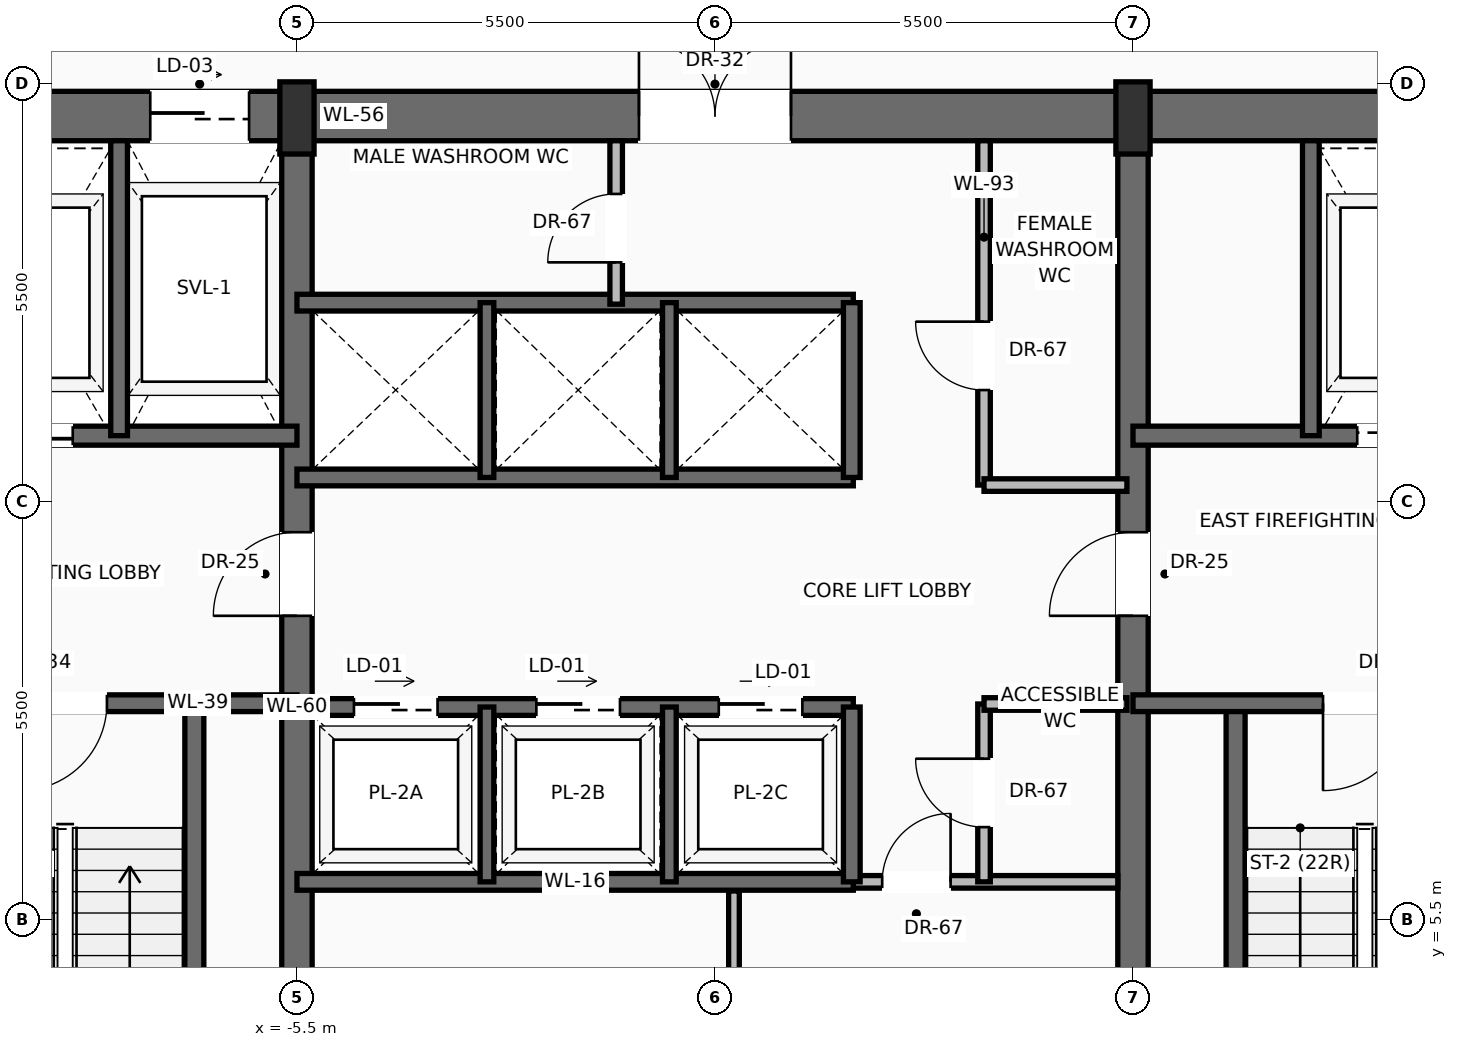
"""IFC4 building model, lengths in metres.
Left out: names, types, materials, properties, quantities, classifications, styles, units other than length and angle.
Written with IfcOpenShell. Run it as: python <this file> out.ifc"""

import sys

from ifc_helpers import new_model, si_unit, direction, frame, frame_2d, origin, origin_2d, place, context, subcontext, project, spatial, rectangle, extrude, source, transform, mapped, element, fill, save


model = new_model("IFC4")
c1 = context("Model", 3, precision=1e-05, world=origin(), true_north=direction((0.0, 1.0)))
c2 = subcontext(c1, "Body", "Model", "MODEL_VIEW")
j1 = project(units=[si_unit("LENGTHUNIT", "METRE"), si_unit("PLANEANGLEUNIT", "RADIAN")], contexts=[c1])
p1 = place(None, origin())
s1 = spatial("IfcSite", under=j1, at=p1, CompositionType="ELEMENT")
p2 = place(p1, origin())
s2 = spatial("IfcBuilding", under=s1, at=p2, CompositionType="ELEMENT")
p3 = place(p2, frame((0.0, 0.0, 200.6)))
s3 = spatial("IfcBuildingStorey", under=s2, at=p3, CompositionType="ELEMENT", Elevation=200.6)
p4 = place(p3, frame((-10.8, 16.075, 0.0), z_axis=(0.0, 0.0, 1.0), x_axis=(1.0, 0.0, 0.0)))
e1 = element("IfcWall", 1, at=p4, inside=s3, PredefinedType="SHEAR", context=c2, shape_type="SweptSolid", body=[
    extrude(rectangle(XDim=21.6, YDim=0.65, at=frame_2d((10.8, 0.0))), origin(), (0.0, 0.0, 1.0), 3.47),
])
p5 = place(p4, frame((3.37, 0.0, 0.0)))
e2 = element("IfcOpeningElement", 2, at=p5, cuts=e1, PredefinedType="OPENING", context=c2, shape_type="SweptSolid", body=[
    extrude(rectangle(XDim=1.3, YDim=2.3, at=frame_2d((0.65, 1.15))), frame((0.0, 0.335, 0.0), z_axis=(0.0, -1.0, 0.0), x_axis=(1.0, 0.0, 0.0)), (0.0, 0.0, 1.0), 0.67),
])
p6 = place(p4, frame((9.8, 0.0, 0.0)))
e3 = element("IfcOpeningElement", 3, at=p6, cuts=e1, PredefinedType="OPENING", context=c2, shape_type="SweptSolid", body=[
    extrude(rectangle(XDim=2.0, YDim=2.4, at=frame_2d((1.0, 1.2))), frame((0.0, 0.335, 0.0), z_axis=(0.0, -1.0, 0.0), x_axis=(1.0, 0.0, 0.0)), (0.0, 0.0, 1.0), 0.67),
])
p7 = place(p3, frame((-5.5, 0.525, 0.0), z_axis=(0.0, 0.0, 1.0), x_axis=(0.0, 1.0, 0.0)))
e4 = element("IfcWall", 4, at=p7, inside=s3, PredefinedType="SHEAR", context=c2, shape_type="SweptSolid", body=[
    extrude(rectangle(XDim=15.55, YDim=0.4, at=frame_2d((7.775, 0.0))), origin(), (0.0, 0.0, 1.0), 3.47),
])
p8 = place(p7, frame((8.975, 0.0, 0.0)))
e5 = element("IfcOpeningElement", 5, at=p8, cuts=e4, PredefinedType="OPENING", context=c2, shape_type="SweptSolid", body=[
    extrude(rectangle(XDim=1.1, YDim=2.2, at=frame_2d((0.55, 1.1))), frame((0.0, 0.21, 0.0), z_axis=(0.0, -1.0, 0.0), x_axis=(1.0, 0.0, 0.0)), (0.0, 0.0, 1.0), 0.42),
])
p9 = place(p3, frame((5.5, 0.525, 0.0), z_axis=(0.0, 0.0, 1.0), x_axis=(0.0, 1.0, 0.0)))
e6 = element("IfcWall", 6, at=p9, inside=s3, PredefinedType="SHEAR", context=c2, shape_type="SweptSolid", body=[
    extrude(rectangle(XDim=15.55, YDim=0.4, at=frame_2d((7.775, 0.0))), origin(), (0.0, 0.0, 1.0), 3.47),
])
p10 = place(p9, frame((8.975, 0.0, 0.0)))
e7 = element("IfcOpeningElement", 7, at=p10, cuts=e6, PredefinedType="OPENING", context=c2, shape_type="SweptSolid", body=[
    extrude(rectangle(XDim=1.1, YDim=2.2, at=frame_2d((0.55, 1.1))), frame((0.0, 0.21, 0.0), z_axis=(0.0, -1.0, 0.0), x_axis=(1.0, 0.0, 0.0)), (0.0, 0.0, 1.0), 0.42),
])
m1 = source(origin(), c2, "Body", "SweptSolid", [
    extrude(rectangle(XDim=0.45, YDim=0.95, at=origin_2d()), origin(), (0.0, 0.0, 1.0), 3.7),
])
for number, where, z_axis, x_axis in (
    (8, (-5.5, 16.05, 0.0), (0.0, 0.0, 1.0), (1.0, 0.0, 0.0)),
    (9, (5.5, 16.05, 0.0), (0.0, 0.0, 1.0), (1.0, 0.0, 0.0)),
):
    element("IfcColumn", number, at=place(p3, frame(where, z_axis=z_axis, x_axis=x_axis)), inside=s3, PredefinedType="PILASTER", context=c2, shape_type="MappedRepresentation", body=[
        mapped(m1, transform((0.0, 0.0, 0.0), scale=1.0)),
    ])
p11 = place(p3, frame((-6.85, 0.85, 0.0), z_axis=(0.0, 0.0, 1.0), x_axis=(0.0, 1.0, 0.0)))
e10 = element("IfcWall", 10, at=p11, inside=s3, PredefinedType="SOLIDWALL", context=c2, shape_type="SweptSolid", body=[
    extrude(rectangle(XDim=7.5, YDim=0.25, at=frame_2d((3.75, 0.0))), origin(), (0.0, 0.0, 1.0), 3.47),
])
p12 = place(p3, frame((-5.5, 8.35, 0.0), z_axis=(0.0, 0.0, 1.0), x_axis=(-1.0, 0.0, 0.0)))
e11 = element("IfcWall", 11, at=p12, inside=s3, PredefinedType="SOLIDWALL", context=c2, shape_type="SweptSolid", body=[
    extrude(rectangle(XDim=4.65, YDim=0.22, at=frame_2d((2.325, 0.0))), origin(), (0.0, 0.0, 1.0), 3.47),
])
p13 = place(p12, frame((2.5, 0.0, 0.0)))
e12 = element("IfcOpeningElement", 12, at=p13, cuts=e11, PredefinedType="OPENING", context=c2, shape_type="SweptSolid", body=[
    extrude(rectangle(XDim=1.15, YDim=2.2, at=frame_2d((0.575, 1.1))), frame((0.0, 0.12, 0.0), z_axis=(0.0, -1.0, 0.0), x_axis=(1.0, 0.0, 0.0)), (0.0, 0.0, 1.0), 0.24),
])
p14 = place(p3, frame((-5.5, 11.87, 0.0), z_axis=(0.0, 0.0, 1.0), x_axis=(-1.0, 0.0, 0.0)))
e13 = element("IfcWall", 13, at=p14, inside=s3, PredefinedType="SOLIDWALL", context=c2, shape_type="SweptSolid", body=[
    extrude(rectangle(XDim=4.65, YDim=0.25, at=frame_2d((2.325, 0.0))), origin(), (0.0, 0.0, 1.0), 3.47),
])
p15 = place(p14, frame((2.95, 0.0, 0.0)))
e14 = element("IfcOpeningElement", 14, at=p15, cuts=e13, PredefinedType="OPENING", context=c2, shape_type="SweptSolid", body=[
    extrude(rectangle(XDim=1.2, YDim=2.25, at=frame_2d((0.6, 1.125))), frame((0.0, 0.135, 0.0), z_axis=(0.0, -1.0, 0.0), x_axis=(1.0, 0.0, 0.0)), (0.0, 0.0, 1.0), 0.27),
])
p16 = place(p3, frame((-7.84, 11.87, 0.0), z_axis=(0.0, 0.0, 1.0), x_axis=(0.0, 1.0, 0.0)))
e15 = element("IfcWall", 15, at=p16, inside=s3, PredefinedType="SOLIDWALL", context=c2, shape_type="SweptSolid", body=[
    extrude(rectangle(XDim=3.88, YDim=0.22, at=frame_2d((1.94, 0.0))), origin(), (0.0, 0.0, 1.0), 3.47),
])
p17 = place(p3, frame((6.85, 0.85, 0.0), z_axis=(0.0, 0.0, 1.0), x_axis=(0.0, 1.0, 0.0)))
e16 = element("IfcWall", 16, at=p17, inside=s3, PredefinedType="SOLIDWALL", context=c2, shape_type="SweptSolid", body=[
    extrude(rectangle(XDim=7.5, YDim=0.25, at=frame_2d((3.75, 0.0))), origin(), (0.0, 0.0, 1.0), 3.47),
])
p18 = place(p3, frame((10.15, 8.35, 0.0), z_axis=(0.0, 0.0, 1.0), x_axis=(-1.0, 0.0, 0.0)))
e17 = element("IfcWall", 17, at=p18, inside=s3, PredefinedType="SOLIDWALL", context=c2, shape_type="SweptSolid", body=[
    extrude(rectangle(XDim=4.65, YDim=0.22, at=frame_2d((2.325, 0.0))), origin(), (0.0, 0.0, 1.0), 3.47),
])
p19 = place(p18, frame((1.0, 0.0, 0.0)))
e18 = element("IfcOpeningElement", 18, at=p19, cuts=e17, PredefinedType="OPENING", context=c2, shape_type="SweptSolid", body=[
    extrude(rectangle(XDim=1.15, YDim=2.2, at=frame_2d((0.575, 1.1))), frame((0.0, 0.12, 0.0), z_axis=(0.0, -1.0, 0.0), x_axis=(1.0, 0.0, 0.0)), (0.0, 0.0, 1.0), 0.24),
])
p20 = place(p3, frame((10.15, 11.87, 0.0), z_axis=(0.0, 0.0, 1.0), x_axis=(-1.0, 0.0, 0.0)))
e19 = element("IfcWall", 19, at=p20, inside=s3, PredefinedType="SOLIDWALL", context=c2, shape_type="SweptSolid", body=[
    extrude(rectangle(XDim=4.65, YDim=0.25, at=frame_2d((2.325, 0.0))), origin(), (0.0, 0.0, 1.0), 3.47),
])
p21 = place(p20, frame((0.5, 0.0, 0.0)))
e20 = element("IfcOpeningElement", 20, at=p21, cuts=e19, PredefinedType="OPENING", context=c2, shape_type="SweptSolid", body=[
    extrude(rectangle(XDim=1.2, YDim=2.25, at=frame_2d((0.6, 1.125))), frame((0.0, 0.135, 0.0), z_axis=(0.0, -1.0, 0.0), x_axis=(1.0, 0.0, 0.0)), (0.0, 0.0, 1.0), 0.27),
])
p22 = place(p3, frame((7.84, 11.87, 0.0), z_axis=(0.0, 0.0, 1.0), x_axis=(0.0, 1.0, 0.0)))
e21 = element("IfcWall", 21, at=p22, inside=s3, PredefinedType="SOLIDWALL", context=c2, shape_type="SweptSolid", body=[
    extrude(rectangle(XDim=3.88, YDim=0.22, at=frame_2d((1.94, 0.0))), origin(), (0.0, 0.0, 1.0), 3.47),
])
p23 = place(p3, frame((1.82, 6.0, 0.0), z_axis=(0.0, 0.0, 1.0), x_axis=(1.0, 0.0, 0.0)))
e22 = element("IfcWall", 22, at=p23, inside=s3, PredefinedType="PARTITIONING", context=c2, shape_type="SweptSolid", body=[
    extrude(rectangle(XDim=3.48, YDim=0.165, at=frame_2d((1.74, 0.0))), origin(), (0.0, 0.0, 1.0), 3.462),
])
p24 = place(p23, frame((0.38, 0.0, 0.0)))
e23 = element("IfcOpeningElement", 23, at=p24, cuts=e22, PredefinedType="OPENING", context=c2, shape_type="SweptSolid", body=[
    extrude(rectangle(XDim=0.9, YDim=2.1, at=frame_2d((0.45, 1.05))), frame((0.0, 0.093, 0.0), z_axis=(0.0, -1.0, 0.0), x_axis=(1.0, 0.0, 0.0)), (0.0, 0.0, 1.0), 0.185),
])
p25 = place(p3, frame((0.25, 0.85, 0.0), z_axis=(0.0, 0.0, 1.0), x_axis=(0.0, 1.0, 0.0)))
e24 = element("IfcWall", 24, at=p25, inside=s3, PredefinedType="PARTITIONING", context=c2, shape_type="SweptSolid", body=[
    extrude(rectangle(XDim=5.03, YDim=0.14, at=frame_2d((2.515, 0.0))), origin(), (0.0, 0.0, 1.0), 3.462),
])
p26 = place(p25, frame((2.1, 0.0, 0.0)))
e25 = element("IfcOpeningElement", 25, at=p26, cuts=e24, PredefinedType="OPENING", context=c2, shape_type="SweptSolid", body=[
    extrude(rectangle(XDim=0.9, YDim=2.1, at=frame_2d((0.45, 1.05))), frame((0.0, 0.08, 0.0), z_axis=(0.0, -1.0, 0.0), x_axis=(1.0, 0.0, 0.0)), (0.0, 0.0, 1.0), 0.16),
])
p27 = place(p3, frame((3.54, 6.0, 0.0), z_axis=(0.0, 0.0, 1.0), x_axis=(0.0, 1.0, 0.0)))
e26 = element("IfcWall", 26, at=p27, inside=s3, PredefinedType="PARTITIONING", context=c2, shape_type="SweptSolid", body=[
    extrude(rectangle(XDim=2.34, YDim=0.165, at=frame_2d((1.17, 0.0))), origin(), (0.0, 0.0, 1.0), 3.462),
])
p28 = place(p27, frame((0.72, 0.0, 0.0)))
e27 = element("IfcOpeningElement", 27, at=p28, cuts=e26, PredefinedType="OPENING", context=c2, shape_type="SweptSolid", body=[
    extrude(rectangle(XDim=0.9, YDim=2.1, at=frame_2d((0.45, 1.05))), frame((0.0, 0.093, 0.0), z_axis=(0.0, -1.0, 0.0), x_axis=(1.0, 0.0, 0.0)), (0.0, 0.0, 1.0), 0.185),
])
p29 = place(p3, frame((3.54, 8.34, 0.0), z_axis=(0.0, 0.0, 1.0), x_axis=(1.0, 0.0, 0.0)))
e28 = element("IfcWall", 28, at=p29, inside=s3, PredefinedType="PARTITIONING", context=c2, shape_type="SweptSolid", body=[
    extrude(rectangle(XDim=1.88, YDim=0.165, at=frame_2d((0.94, 0.0))), origin(), (0.0, 0.0, 1.0), 3.462),
])
p30 = place(p3, frame((-5.5, 6.0, 0.0), z_axis=(0.0, 0.0, 1.0), x_axis=(1.0, 0.0, 0.0)))
e29 = element("IfcWall", 29, at=p30, inside=s3, PredefinedType="SOLIDWALL", context=c2, shape_type="SweptSolid", body=[
    extrude(rectangle(XDim=7.32, YDim=0.22, at=frame_2d((3.66, 0.0))), origin(), (0.0, 0.0, 1.0), 3.47),
])
p31 = place(p3, frame((-5.5, 8.3, 0.0), z_axis=(0.0, 0.0, 1.0), x_axis=(1.0, 0.0, 0.0)))
e30 = element("IfcWall", 30, at=p31, inside=s3, PredefinedType="SOLIDWALL", context=c2, shape_type="SweptSolid", body=[
    extrude(rectangle(XDim=7.32, YDim=0.22, at=frame_2d((3.66, 0.0))), origin(), (0.0, 0.0, 1.0), 3.47),
])
p32 = place(p31, frame((0.75, 0.0, 0.0)))
e31 = element("IfcOpeningElement", 31, at=p32, cuts=e30, PredefinedType="OPENING", context=c2, shape_type="SweptSolid", body=[
    extrude(rectangle(XDim=1.1, YDim=2.2, at=frame_2d((0.55, 1.1))), frame((0.0, 0.12, 0.0), z_axis=(0.0, -1.0, 0.0), x_axis=(1.0, 0.0, 0.0)), (0.0, 0.0, 1.0), 0.24),
])
p33 = place(p31, frame((3.15, 0.0, 0.0)))
e32 = element("IfcOpeningElement", 32, at=p33, cuts=e30, PredefinedType="OPENING", context=c2, shape_type="SweptSolid", body=[
    extrude(rectangle(XDim=1.1, YDim=2.2, at=frame_2d((0.55, 1.1))), frame((0.0, 0.12, 0.0), z_axis=(0.0, -1.0, 0.0), x_axis=(1.0, 0.0, 0.0)), (0.0, 0.0, 1.0), 0.24),
])
p34 = place(p31, frame((5.55, 0.0, 0.0)))
e33 = element("IfcOpeningElement", 33, at=p34, cuts=e30, PredefinedType="OPENING", context=c2, shape_type="SweptSolid", body=[
    extrude(rectangle(XDim=1.1, YDim=2.2, at=frame_2d((0.55, 1.1))), frame((0.0, 0.12, 0.0), z_axis=(0.0, -1.0, 0.0), x_axis=(1.0, 0.0, 0.0)), (0.0, 0.0, 1.0), 0.24),
])
p35 = place(p3, frame((1.8, 6.0, 0.0), z_axis=(0.0, 0.0, 1.0), x_axis=(0.0, 1.0, 0.0)))
e34 = element("IfcWall", 34, at=p35, inside=s3, PredefinedType="SOLIDWALL", context=c2, shape_type="SweptSolid", body=[
    extrude(rectangle(XDim=2.3, YDim=0.22, at=frame_2d((1.15, 0.0))), origin(), (0.0, 0.0, 1.0), 3.47),
])
for number, where, z_axis, x_axis in (
    (35, (-3.0, 6.0, 0.0), (0.0, 0.0, 1.0), (0.0, 1.0, 0.0)),
    (36, (-0.6, 6.0, 0.0), (0.0, 0.0, 1.0), (0.0, 1.0, 0.0)),
):
    element("IfcWall", number, at=place(p3, frame(where, z_axis=z_axis, x_axis=x_axis)), inside=s3, PredefinedType="SOLIDWALL", context=c2, shape_type="SweptSolid", body=[
        extrude(rectangle(XDim=2.3, YDim=0.18, at=frame_2d((1.15, 0.0))), origin(), (0.0, 0.0, 1.0), 3.47),
    ])
for number, where, z_axis, x_axis in (
    (37, (-5.5, 11.32, 0.0), (0.0, 0.0, 1.0), (1.0, 0.0, 0.0)),
    (38, (-5.5, 13.62, 0.0), (0.0, 0.0, 1.0), (1.0, 0.0, 0.0)),
):
    element("IfcWall", number, at=place(p3, frame(where, z_axis=z_axis, x_axis=x_axis)), inside=s3, PredefinedType="SOLIDWALL", context=c2, shape_type="SweptSolid", body=[
        extrude(rectangle(XDim=7.32, YDim=0.22, at=frame_2d((3.66, 0.0))), origin(), (0.0, 0.0, 1.0), 3.47),
    ])
p36 = place(p3, frame((1.8, 11.32, 0.0), z_axis=(0.0, 0.0, 1.0), x_axis=(0.0, 1.0, 0.0)))
e39 = element("IfcWall", 39, at=p36, inside=s3, PredefinedType="SOLIDWALL", context=c2, shape_type="SweptSolid", body=[
    extrude(rectangle(XDim=2.3, YDim=0.22, at=frame_2d((1.15, 0.0))), origin(), (0.0, 0.0, 1.0), 3.47),
])
for number, where, z_axis, x_axis in (
    (40, (-3.0, 11.32, 0.0), (0.0, 0.0, 1.0), (0.0, 1.0, 0.0)),
    (41, (-0.6, 11.32, 0.0), (0.0, 0.0, 1.0), (0.0, 1.0, 0.0)),
):
    element("IfcWall", number, at=place(p3, frame(where, z_axis=z_axis, x_axis=x_axis)), inside=s3, PredefinedType="SOLIDWALL", context=c2, shape_type="SweptSolid", body=[
        extrude(rectangle(XDim=2.3, YDim=0.18, at=frame_2d((1.15, 0.0))), origin(), (0.0, 0.0, 1.0), 3.47),
    ])
p37 = place(p3, frame((-1.3, 13.6, 0.0), z_axis=(0.0, 0.0, 1.0), x_axis=(0.0, 1.0, 0.0)))
e42 = element("IfcWall", 42, at=p37, inside=s3, PredefinedType="PARTITIONING", context=c2, shape_type="SweptSolid", body=[
    extrude(rectangle(XDim=2.15, YDim=0.165, at=frame_2d((1.075, 0.0))), origin(), (0.0, 0.0, 1.0), 3.462),
])
p38 = place(p37, frame((0.55, 0.0, 0.0)))
e43 = element("IfcOpeningElement", 43, at=p38, cuts=e42, PredefinedType="OPENING", context=c2, shape_type="SweptSolid", body=[
    extrude(rectangle(XDim=0.9, YDim=2.1, at=frame_2d((0.45, 1.05))), frame((0.0, 0.093, 0.0), z_axis=(0.0, -1.0, 0.0), x_axis=(1.0, 0.0, 0.0)), (0.0, 0.0, 1.0), 0.185),
])
p39 = place(p3, frame((3.54, 11.22, 0.0), z_axis=(0.0, 0.0, 1.0), x_axis=(0.0, 1.0, 0.0)))
e44 = element("IfcWall", 44, at=p39, inside=s3, PredefinedType="PARTITIONING", context=c2, shape_type="SweptSolid", body=[
    extrude(rectangle(XDim=4.53, YDim=0.165, at=frame_2d((2.265, 0.0))), origin(), (0.0, 0.0, 1.0), 3.462),
])
p40 = place(p39, frame((1.25, 0.0, 0.0)))
e45 = element("IfcOpeningElement", 45, at=p40, cuts=e44, PredefinedType="OPENING", context=c2, shape_type="SweptSolid", body=[
    extrude(rectangle(XDim=0.9, YDim=2.1, at=frame_2d((0.45, 1.05))), frame((0.0, 0.093, 0.0), z_axis=(0.0, -1.0, 0.0), x_axis=(1.0, 0.0, 0.0)), (0.0, 0.0, 1.0), 0.185),
])
p41 = place(p3, frame((3.54, 11.22, 0.0), z_axis=(0.0, 0.0, 1.0), x_axis=(1.0, 0.0, 0.0)))
e46 = element("IfcWall", 46, at=p41, inside=s3, PredefinedType="PARTITIONING", context=c2, shape_type="SweptSolid", body=[
    extrude(rectangle(XDim=1.88, YDim=0.165, at=frame_2d((0.94, 0.0))), origin(), (0.0, 0.0, 1.0), 3.462),
])
m2 = source(origin(), c2, "Body", "SweptSolid", [
    extrude(rectangle(XDim=1.15, YDim=2.2, at=frame_2d((0.575, 1.1))), frame((0.0, 0.025, 0.0), z_axis=(0.0, -1.0, 0.0), x_axis=(1.0, 0.0, 0.0)), (0.0, 0.0, 1.0), 0.05),
])
p42 = place(p13, origin())
e47 = element("IfcDoor", 47, at=p42, inside=s3, OperationType="SINGLE_SWING_RIGHT", PredefinedType="DOOR", context=c2, shape_type="MappedRepresentation", body=[
    mapped(m2, transform((0.0, 0.0, 0.0), scale=1.0)),
])
fill(e12, e47)
m3 = source(origin(), c2, "Body", "SweptSolid", [
    extrude(rectangle(XDim=1.1, YDim=2.2, at=frame_2d((0.55, 1.1))), frame((0.0, 0.025, 0.0), z_axis=(0.0, -1.0, 0.0), x_axis=(1.0, 0.0, 0.0)), (0.0, 0.0, 1.0), 0.05),
])
p43 = place(p8, origin())
e48 = element("IfcDoor", 48, at=p43, inside=s3, OperationType="SINGLE_SWING_LEFT", PredefinedType="DOOR", context=c2, shape_type="MappedRepresentation", body=[
    mapped(m3, transform((0.0, 0.0, 0.0), scale=1.0)),
])
fill(e5, e48)
m4 = source(origin(), c2, "Body", "SweptSolid", [
    extrude(rectangle(XDim=1.2, YDim=2.25, at=frame_2d((0.6, 1.125))), frame((0.0, 0.025, 0.0), z_axis=(0.0, -1.0, 0.0), x_axis=(1.0, 0.0, 0.0)), (0.0, 0.0, 1.0), 0.05),
])
p44 = place(p15, origin())
e49 = element("IfcDoor", 49, at=p44, inside=s3, OperationType="SLIDING_TO_LEFT", PredefinedType="DOOR", context=c2, shape_type="MappedRepresentation", body=[
    mapped(m4, transform((0.0, 0.0, 0.0), scale=1.0)),
])
fill(e14, e49)
m5 = source(origin(), c2, "Body", "SweptSolid", [
    extrude(rectangle(XDim=1.3, YDim=2.3, at=frame_2d((0.65, 1.15))), frame((0.0, 0.025, 0.0), z_axis=(0.0, -1.0, 0.0), x_axis=(1.0, 0.0, 0.0)), (0.0, 0.0, 1.0), 0.05),
])
p45 = place(p5, origin())
e50 = element("IfcDoor", 50, at=p45, inside=s3, OperationType="SLIDING_TO_RIGHT", PredefinedType="DOOR", context=c2, shape_type="MappedRepresentation", body=[
    mapped(m5, transform((0.0, 0.0, 0.0), scale=1.0)),
])
fill(e2, e50)
p46 = place(p19, origin())
e51 = element("IfcDoor", 51, at=p46, inside=s3, OperationType="SINGLE_SWING_RIGHT", PredefinedType="DOOR", context=c2, shape_type="MappedRepresentation", body=[
    mapped(m2, transform((0.0, 0.0, 0.0), scale=1.0)),
])
fill(e18, e51)
p47 = place(p10, origin())
e52 = element("IfcDoor", 52, at=p47, inside=s3, OperationType="SINGLE_SWING_LEFT", PredefinedType="DOOR", context=c2, shape_type="MappedRepresentation", body=[
    mapped(m3, transform((0.0, 0.0, 0.0), scale=1.0)),
])
fill(e7, e52)
p48 = place(p21, origin())
e53 = element("IfcDoor", 53, at=p48, inside=s3, OperationType="SLIDING_TO_RIGHT", PredefinedType="DOOR", context=c2, shape_type="MappedRepresentation", body=[
    mapped(m4, transform((0.0, 0.0, 0.0), scale=1.0)),
])
fill(e20, e53)
m6 = source(origin(), c2, "Body", "SweptSolid", [
    extrude(rectangle(XDim=2.0, YDim=2.4, at=frame_2d((1.0, 1.2))), frame((0.0, 0.025, 0.0), z_axis=(0.0, -1.0, 0.0), x_axis=(1.0, 0.0, 0.0)), (0.0, 0.0, 1.0), 0.05),
])
p49 = place(p6, origin())
e54 = element("IfcDoor", 54, at=p49, inside=s3, OperationType="DOUBLE_DOOR_SINGLE_SWING", PredefinedType="DOOR", context=c2, shape_type="MappedRepresentation", body=[
    mapped(m6, transform((0.0, 0.0, 0.0), scale=1.0)),
])
fill(e3, e54)
m7 = source(origin(), c2, "Body", "SweptSolid", [
    extrude(rectangle(XDim=0.9, YDim=2.1, at=frame_2d((0.45, 1.05))), frame((0.0, 0.025, 0.0), z_axis=(0.0, -1.0, 0.0), x_axis=(1.0, 0.0, 0.0)), (0.0, 0.0, 1.0), 0.05),
])
p50 = place(p24, origin())
e55 = element("IfcDoor", 55, at=p50, inside=s3, OperationType="SINGLE_SWING_RIGHT", PredefinedType="DOOR", context=c2, shape_type="MappedRepresentation", body=[
    mapped(m7, transform((0.0, 0.0, 0.0), scale=1.0)),
])
fill(e23, e55)
p51 = place(p28, origin())
e56 = element("IfcDoor", 56, at=p51, inside=s3, OperationType="SINGLE_SWING_RIGHT", PredefinedType="DOOR", context=c2, shape_type="MappedRepresentation", body=[
    mapped(m7, transform((0.0, 0.0, 0.0), scale=1.0)),
])
fill(e27, e56)
m8 = source(origin(), c2, "Body", "SweptSolid", [
    extrude(rectangle(XDim=1.1, YDim=2.2, at=frame_2d((0.55, 1.1))), frame((0.0, 0.025, 0.0), z_axis=(0.0, -1.0, 0.0), x_axis=(1.0, 0.0, 0.0)), (0.0, 0.0, 1.0), 0.05),
])
p52 = place(p32, origin())
e57 = element("IfcDoor", 57, at=p52, inside=s3, OperationType="SLIDING_TO_LEFT", PredefinedType="DOOR", context=c2, shape_type="MappedRepresentation", body=[
    mapped(m8, transform((0.0, 0.0, 0.0), scale=1.0)),
])
fill(e31, e57)
p53 = place(p33, origin())
e58 = element("IfcDoor", 58, at=p53, inside=s3, OperationType="SLIDING_TO_LEFT", PredefinedType="DOOR", context=c2, shape_type="MappedRepresentation", body=[
    mapped(m8, transform((0.0, 0.0, 0.0), scale=1.0)),
])
fill(e32, e58)
p54 = place(p34, origin())
e59 = element("IfcDoor", 59, at=p54, inside=s3, OperationType="SLIDING_TO_LEFT", PredefinedType="DOOR", context=c2, shape_type="MappedRepresentation", body=[
    mapped(m8, transform((0.0, 0.0, 0.0), scale=1.0)),
])
fill(e33, e59)
p55 = place(p38, origin())
e60 = element("IfcDoor", 60, at=p55, inside=s3, OperationType="SINGLE_SWING_LEFT", PredefinedType="DOOR", context=c2, shape_type="MappedRepresentation", body=[
    mapped(m7, transform((0.0, 0.0, 0.0), scale=1.0)),
])
fill(e43, e60)
p56 = place(p40, origin())
e61 = element("IfcDoor", 61, at=p56, inside=s3, OperationType="SINGLE_SWING_RIGHT", PredefinedType="DOOR", context=c2, shape_type="MappedRepresentation", body=[
    mapped(m7, transform((0.0, 0.0, 0.0), scale=1.0)),
])
fill(e45, e61)
save(model, sys.argv[1])
